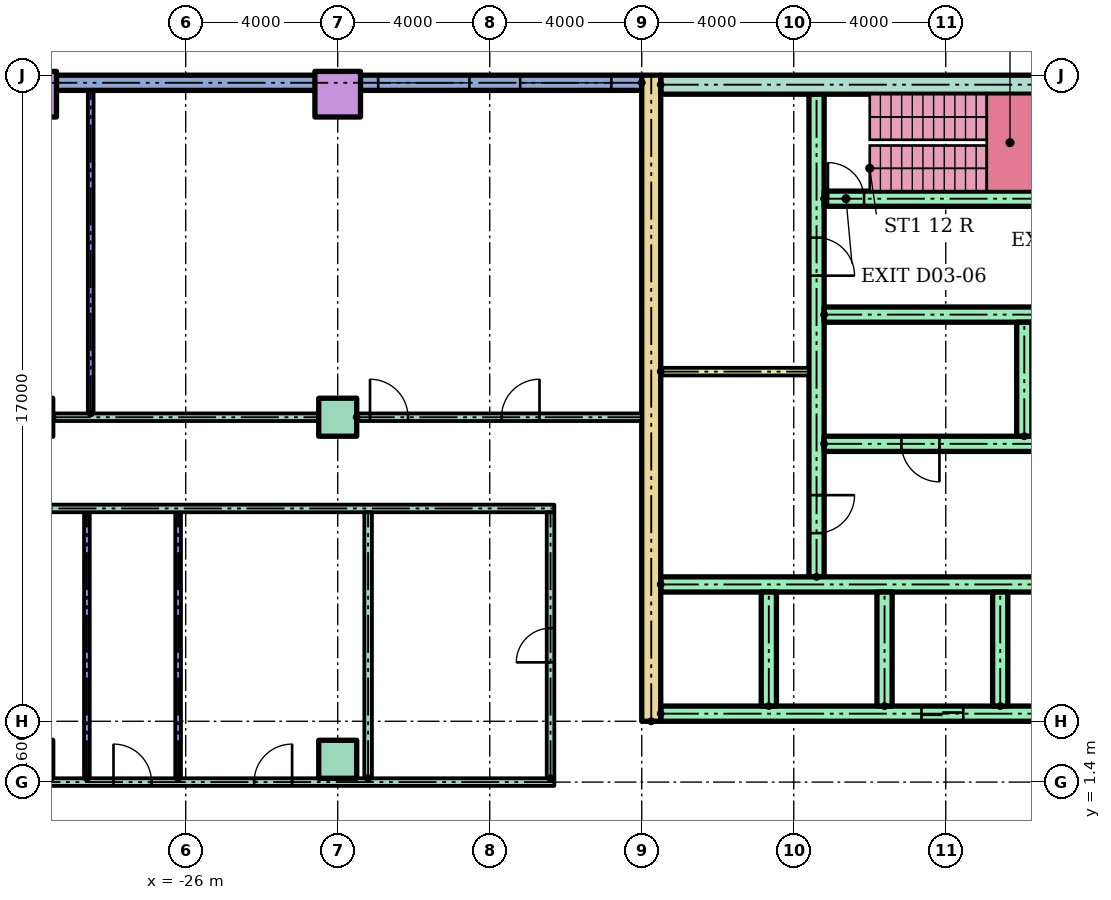
"""IFC4 building model, lengths in metres.
Left out: names, types, materials, properties, quantities, classifications, styles, units other than length and angle.
Written with IfcOpenShell. Run it as: python <this file> out.ifc"""

import sys

from ifc_helpers import new_model, si_unit, direction, frame, frame_2d, origin, origin_2d, place, context, subcontext, project, spatial, rectangle, hollow_rectangle, extrude, element, fill, save


model = new_model("IFC4")
c1 = context("Model", 3, precision=1e-05, world=origin(), true_north=direction((0.0, 1.0)))
c2 = subcontext(c1, "Body", "Model", "MODEL_VIEW")
j1 = project(units=[si_unit("LENGTHUNIT", "METRE"), si_unit("PLANEANGLEUNIT", "RADIAN")], contexts=[c1])
p1 = place(None, origin())
s1 = spatial("IfcSite", under=j1, at=p1, CompositionType="ELEMENT")
p2 = place(p1, origin())
s2 = spatial("IfcBuilding", under=s1, at=p2, CompositionType="ELEMENT")
p3 = place(p2, frame((0.0, 0.0, 14.0)))
s3 = spatial("IfcBuildingStorey", under=s2, at=p3, CompositionType="ELEMENT", Elevation=14.0)
for number, where in (
    (1, (-30.0, 2.0, 0.0)),
    (2, (-22.0, 2.0, 0.0)),
    (3, (-30.0, 11.0, 0.0)),
    (4, (-22.0, 11.0, 0.0)),
):
    element("IfcColumn", number, at=place(p3, frame(where)), inside=s3, PredefinedType="COLUMN", context=c2, shape_type="SweptSolid", body=[
        extrude(rectangle(XDim=1.0, YDim=1.0, at=origin_2d()), origin(), (0.0, 0.0, 1.0), 4.0),
    ])
for number, where in (
    (5, (-30.0, 19.5, 0.0)),
    (6, (-22.0, 19.5, 0.0)),
):
    element("IfcColumn", number, at=place(p3, frame(where)), inside=s3, PredefinedType="COLUMN", context=c2, shape_type="SweptSolid", body=[
        extrude(hollow_rectangle(XDim=1.2, YDim=1.2, WallThickness=0.06, at=origin_2d()), origin(), (0.0, 0.0, 1.0), 4.0),
    ])
p4 = place(p3, frame((-14.0, 19.8, 0.0), z_axis=(0.0, 0.0, 1.0), x_axis=(-1.0, 0.0, 0.0)))
e7 = element("IfcWall", 7, at=p4, inside=s3, PredefinedType="STANDARD", context=c2, shape_type="SweptSolid", body=[
    extrude(rectangle(XDim=25.6, YDim=0.4, at=frame_2d((12.8, 0.0))), origin(), (0.0, 0.0, 1.0), 3.7),
])
p5 = place(p4, frame((0.8, 0.0, 0.9)))
e8 = element("IfcOpeningElement", 8, at=p5, cuts=e7, PredefinedType="OPENING", context=c2, shape_type="SweptSolid", body=[
    extrude(rectangle(XDim=2.4, YDim=2.1, at=frame_2d((1.2, 1.05))), frame((0.0, 0.21, 0.0), z_axis=(0.0, -1.0, 0.0), x_axis=(1.0, 0.0, 0.0)), (0.0, 0.0, 1.0), 0.42),
])
p6 = place(p4, frame((4.535, 0.0, 0.9)))
e9 = element("IfcOpeningElement", 9, at=p6, cuts=e7, PredefinedType="OPENING", context=c2, shape_type="SweptSolid", body=[
    extrude(rectangle(XDim=2.4, YDim=2.1, at=frame_2d((1.2, 1.05))), frame((0.0, 0.21, 0.0), z_axis=(0.0, -1.0, 0.0), x_axis=(1.0, 0.0, 0.0)), (0.0, 0.0, 1.0), 0.42),
])
p7 = place(p4, frame((20.8, 0.0, 0.9)))
e10 = element("IfcOpeningElement", 10, at=p7, cuts=e7, PredefinedType="OPENING", context=c2, shape_type="SweptSolid", body=[
    extrude(rectangle(XDim=2.4, YDim=2.1, at=frame_2d((1.2, 1.05))), frame((0.0, 0.21, 0.0), z_axis=(0.0, -1.0, 0.0), x_axis=(1.0, 0.0, 0.0)), (0.0, 0.0, 1.0), 0.42),
])
p8 = place(p3, frame((-13.75, 3.0, 0.0), z_axis=(0.0, 0.0, 1.0), x_axis=(0.0, 1.0, 0.0)))
e11 = element("IfcWall", 11, at=p8, inside=s3, PredefinedType="SHEAR", context=c2, shape_type="SweptSolid", body=[
    extrude(rectangle(XDim=17.0, YDim=0.5, at=frame_2d((8.5, 0.0))), origin(), (0.0, 0.0, 1.0), 3.7),
])
p9 = place(p3, frame((-13.5, 19.75, 0.0)))
e12 = element("IfcWall", 12, at=p9, inside=s3, PredefinedType="SHEAR", context=c2, shape_type="SweptSolid", body=[
    extrude(rectangle(XDim=27.0, YDim=0.5, at=frame_2d((13.5, 0.0))), origin(), (0.0, 0.0, 1.0), 3.7),
])
p10 = place(p3, frame((-9.4, 6.8, 0.0), z_axis=(0.0, 0.0, 1.0), x_axis=(0.0, 1.0, 0.0)))
e13 = element("IfcWall", 13, at=p10, inside=s3, PredefinedType="SHEAR", context=c2, shape_type="SweptSolid", body=[
    extrude(rectangle(XDim=12.7, YDim=0.4, at=frame_2d((6.35, 0.0))), origin(), (0.0, 0.0, 1.0), 3.7),
])
p11 = place(p10, frame((1.15, 0.0, 0.0)))
e14 = element("IfcOpeningElement", 14, at=p11, cuts=e13, PredefinedType="OPENING", context=c2, shape_type="SweptSolid", body=[
    extrude(rectangle(XDim=1.0, YDim=2.1, at=frame_2d((0.5, 1.05))), frame((0.0, 0.21, 0.0), z_axis=(0.0, -1.0, 0.0), x_axis=(1.0, 0.0, 0.0)), (0.0, 0.0, 1.0), 0.42),
])
p12 = place(p10, frame((7.925, 0.0, 0.0)))
e15 = element("IfcOpeningElement", 15, at=p12, cuts=e13, PredefinedType="OPENING", context=c2, shape_type="SweptSolid", body=[
    extrude(rectangle(XDim=1.0, YDim=2.1, at=frame_2d((0.5, 1.05))), frame((0.0, 0.21, 0.0), z_axis=(0.0, -1.0, 0.0), x_axis=(1.0, 0.0, 0.0)), (0.0, 0.0, 1.0), 0.42),
])
p13 = place(p3, frame((-13.5, 3.2, 0.0)))
e16 = element("IfcWall", 16, at=p13, inside=s3, PredefinedType="SHEAR", context=c2, shape_type="SweptSolid", body=[
    extrude(rectangle(XDim=27.0, YDim=0.4, at=frame_2d((13.5, 0.0))), origin(), (0.0, 0.0, 1.0), 3.7),
])
p14 = place(p13, frame((6.861, 0.0, 0.0)))
e17 = element("IfcOpeningElement", 17, at=p14, cuts=e16, PredefinedType="OPENING", context=c2, shape_type="SweptSolid", body=[
    extrude(rectangle(XDim=1.1, YDim=2.1, at=frame_2d((0.55, 1.05))), frame((0.0, 0.21, 0.0), z_axis=(0.0, -1.0, 0.0), x_axis=(1.0, 0.0, 0.0)), (0.0, 0.0, 1.0), 0.42),
])
p15 = place(p13, frame((9.906, 0.0, 0.0)))
e18 = element("IfcOpeningElement", 18, at=p15, cuts=e16, PredefinedType="OPENING", context=c2, shape_type="SweptSolid", body=[
    extrude(rectangle(XDim=1.1, YDim=2.1, at=frame_2d((0.55, 1.05))), frame((0.0, 0.21, 0.0), z_axis=(0.0, -1.0, 0.0), x_axis=(1.0, 0.0, 0.0)), (0.0, 0.0, 1.0), 0.42),
])
p16 = place(p13, frame((15.994, 0.0, 0.0)))
e19 = element("IfcOpeningElement", 19, at=p16, cuts=e16, PredefinedType="OPENING", context=c2, shape_type="SweptSolid", body=[
    extrude(rectangle(XDim=1.1, YDim=2.1, at=frame_2d((0.55, 1.05))), frame((0.0, 0.21, 0.0), z_axis=(0.0, -1.0, 0.0), x_axis=(1.0, 0.0, 0.0)), (0.0, 0.0, 1.0), 0.42),
])
p17 = place(p13, frame((19.039, 0.0, 0.0)))
e20 = element("IfcOpeningElement", 20, at=p17, cuts=e16, PredefinedType="OPENING", context=c2, shape_type="SweptSolid", body=[
    extrude(rectangle(XDim=1.1, YDim=2.1, at=frame_2d((0.55, 1.05))), frame((0.0, 0.21, 0.0), z_axis=(0.0, -1.0, 0.0), x_axis=(1.0, 0.0, 0.0)), (0.0, 0.0, 1.0), 0.42),
])
p18 = place(p13, frame((12.6, 0.0, 0.0)))
e21 = element("IfcOpeningElement", 21, at=p18, cuts=e16, PredefinedType="OPENING", context=c2, shape_type="SweptSolid", body=[
    extrude(rectangle(XDim=1.8, YDim=2.1, at=frame_2d((0.9, 1.05))), frame((0.0, 0.21, 0.0), z_axis=(0.0, -1.0, 0.0), x_axis=(1.0, 0.0, 0.0)), (0.0, 0.0, 1.0), 0.42),
])
p19 = place(p3, frame((-13.5, 6.6, 0.0)))
e22 = element("IfcWall", 22, at=p19, inside=s3, PredefinedType="SHEAR", context=c2, shape_type="SweptSolid", body=[
    extrude(rectangle(XDim=11.978, YDim=0.4, at=frame_2d((5.989, 0.0))), origin(), (0.0, 0.0, 1.0), 3.7),
])
for number, where, z_axis, x_axis in (
    (23, (-10.656, 3.4, 0.0), (0.0, 0.0, 1.0), (0.0, 1.0, 0.0)),
    (24, (-7.611, 3.4, 0.0), (0.0, 0.0, 1.0), (0.0, 1.0, 0.0)),
    (25, (-4.567, 3.4, 0.0), (0.0, 0.0, 1.0), (0.0, 1.0, 0.0)),
):
    element("IfcWall", number, at=place(p3, frame(where, z_axis=z_axis, x_axis=x_axis)), inside=s3, PredefinedType="SHEAR", context=c2, shape_type="SweptSolid", body=[
        extrude(rectangle(XDim=3.0, YDim=0.4, at=frame_2d((1.5, 0.0))), origin(), (0.0, 0.0, 1.0), 3.7),
    ])
p20 = place(p3, frame((-9.2, 10.3, 0.0)))
e26 = element("IfcWall", 26, at=p20, inside=s3, PredefinedType="SHEAR", context=c2, shape_type="SweptSolid", body=[
    extrude(rectangle(XDim=8.0, YDim=0.4, at=frame_2d((4.0, 0.0))), origin(), (0.0, 0.0, 1.0), 3.7),
])
p21 = place(p20, frame((2.033, 0.0, 0.0)))
e27 = element("IfcOpeningElement", 27, at=p21, cuts=e26, PredefinedType="OPENING", context=c2, shape_type="SweptSolid", body=[
    extrude(rectangle(XDim=1.0, YDim=2.1, at=frame_2d((0.5, 1.05))), frame((0.0, 0.21, 0.0), z_axis=(0.0, -1.0, 0.0), x_axis=(1.0, 0.0, 0.0)), (0.0, 0.0, 1.0), 0.42),
])
p22 = place(p20, frame((6.133, 0.0, 0.0)))
e28 = element("IfcOpeningElement", 28, at=p22, cuts=e26, PredefinedType="OPENING", context=c2, shape_type="SweptSolid", body=[
    extrude(rectangle(XDim=1.0, YDim=2.1, at=frame_2d((0.5, 1.05))), frame((0.0, 0.21, 0.0), z_axis=(0.0, -1.0, 0.0), x_axis=(1.0, 0.0, 0.0)), (0.0, 0.0, 1.0), 0.42),
])
p23 = place(p3, frame((-9.2, 13.7, 0.0)))
e29 = element("IfcWall", 29, at=p23, inside=s3, PredefinedType="SHEAR", context=c2, shape_type="SweptSolid", body=[
    extrude(rectangle(XDim=8.0, YDim=0.4, at=frame_2d((4.0, 0.0))), origin(), (0.0, 0.0, 1.0), 3.7),
])
p24 = place(p3, frame((-3.933, 10.5, 0.0), z_axis=(0.0, 0.0, 1.0), x_axis=(0.0, 1.0, 0.0)))
e30 = element("IfcWall", 30, at=p24, inside=s3, PredefinedType="SHEAR", context=c2, shape_type="SweptSolid", body=[
    extrude(rectangle(XDim=3.0, YDim=0.4, at=frame_2d((1.5, 0.0))), origin(), (0.0, 0.0, 1.0), 3.7),
])
p25 = place(p3, frame((-9.2, 16.75, 0.0)))
e31 = element("IfcWall", 31, at=p25, inside=s3, PredefinedType="SHEAR", context=c2, shape_type="SweptSolid", body=[
    extrude(rectangle(XDim=18.4, YDim=0.4, at=frame_2d((9.2, 0.0))), origin(), (0.0, 0.0, 1.0), 3.7),
])
p26 = place(p25, frame((0.1, 0.0, 0.0)))
e32 = element("IfcOpeningElement", 32, at=p26, cuts=e31, PredefinedType="OPENING", context=c2, shape_type="SweptSolid", body=[
    extrude(rectangle(XDim=0.95, YDim=2.1, at=frame_2d((0.475, 1.05))), frame((0.0, 0.21, 0.0), z_axis=(0.0, -1.0, 0.0), x_axis=(1.0, 0.0, 0.0)), (0.0, 0.0, 1.0), 0.42),
])
p27 = place(p25, frame((6.1, 0.0, 0.0)))
e33 = element("IfcOpeningElement", 33, at=p27, cuts=e31, PredefinedType="OPENING", context=c2, shape_type="SweptSolid", body=[
    extrude(rectangle(XDim=0.95, YDim=2.1, at=frame_2d((0.475, 1.05))), frame((0.0, 0.21, 0.0), z_axis=(0.0, -1.0, 0.0), x_axis=(1.0, 0.0, 0.0)), (0.0, 0.0, 1.0), 0.42),
])
p28 = place(p25, frame((12.1, 0.0, 0.0)))
e34 = element("IfcOpeningElement", 34, at=p28, cuts=e31, PredefinedType="OPENING", context=c2, shape_type="SweptSolid", body=[
    extrude(rectangle(XDim=0.95, YDim=2.1, at=frame_2d((0.475, 1.05))), frame((0.0, 0.21, 0.0), z_axis=(0.0, -1.0, 0.0), x_axis=(1.0, 0.0, 0.0)), (0.0, 0.0, 1.0), 0.42),
])
p29 = place(p3, frame((-13.5, 12.2, 0.0)))
e35 = element("IfcWall", 35, at=p29, inside=s3, PredefinedType="PARTITIONING", context=c2, shape_type="SweptSolid", body=[
    extrude(rectangle(XDim=3.9, YDim=0.2, at=frame_2d((1.95, 0.0))), origin(), (0.0, 0.0, 1.0), 3.7),
])
p30 = place(p3, frame((-36.9, 1.4, 0.0)))
e36 = element("IfcWall", 36, at=p30, inside=s3, PredefinedType="PARTITIONING", context=c2, shape_type="SweptSolid", body=[
    extrude(rectangle(XDim=20.6, YDim=0.2, at=frame_2d((10.3, 0.0))), origin(), (0.0, 0.0, 1.0), 3.7),
])
p31 = place(p30, frame((5.25, 0.0, 0.0)))
e37 = element("IfcOpeningElement", 37, at=p31, cuts=e36, PredefinedType="OPENING", context=c2, shape_type="SweptSolid", body=[
    extrude(rectangle(XDim=1.0, YDim=2.1, at=frame_2d((0.5, 1.05))), frame((0.0, 0.11, 0.0), z_axis=(0.0, -1.0, 0.0), x_axis=(1.0, 0.0, 0.0)), (0.0, 0.0, 1.0), 0.22),
])
p32 = place(p30, frame((9.0, 0.0, 0.0)))
e38 = element("IfcOpeningElement", 38, at=p32, cuts=e36, PredefinedType="OPENING", context=c2, shape_type="SweptSolid", body=[
    extrude(rectangle(XDim=1.0, YDim=2.1, at=frame_2d((0.5, 1.05))), frame((0.0, 0.11, 0.0), z_axis=(0.0, -1.0, 0.0), x_axis=(1.0, 0.0, 0.0)), (0.0, 0.0, 1.0), 0.22),
])
p33 = place(p30, frame((12.7, 0.0, 0.0)))
e39 = element("IfcOpeningElement", 39, at=p33, cuts=e36, PredefinedType="OPENING", context=c2, shape_type="SweptSolid", body=[
    extrude(rectangle(XDim=1.0, YDim=2.1, at=frame_2d((0.5, 1.05))), frame((0.0, 0.11, 0.0), z_axis=(0.0, -1.0, 0.0), x_axis=(1.0, 0.0, 0.0)), (0.0, 0.0, 1.0), 0.22),
])
p34 = place(p3, frame((-37.6, 8.6, 0.0)))
e40 = element("IfcWall", 40, at=p34, inside=s3, PredefinedType="PARTITIONING", context=c2, shape_type="SweptSolid", body=[
    extrude(rectangle(XDim=21.3, YDim=0.2, at=frame_2d((10.65, 0.0))), origin(), (0.0, 0.0, 1.0), 3.7),
])
p35 = place(p3, frame((-29.5, 11.0, 0.0)))
e41 = element("IfcWall", 41, at=p35, inside=s3, PredefinedType="PARTITIONING", context=c2, shape_type="SweptSolid", body=[
    extrude(rectangle(XDim=7.0, YDim=0.2, at=frame_2d((3.5, 0.0))), origin(), (0.0, 0.0, 1.0), 3.7),
])
p36 = place(p3, frame((-21.5, 11.0, 0.0)))
e42 = element("IfcWall", 42, at=p36, inside=s3, PredefinedType="PARTITIONING", context=c2, shape_type="SweptSolid", body=[
    extrude(rectangle(XDim=7.5, YDim=0.2, at=frame_2d((3.75, 0.0))), origin(), (0.0, 0.0, 1.0), 3.7),
])
p37 = place(p36, frame((0.35, 0.0, 0.0)))
e43 = element("IfcOpeningElement", 43, at=p37, cuts=e42, PredefinedType="OPENING", context=c2, shape_type="SweptSolid", body=[
    extrude(rectangle(XDim=1.0, YDim=2.1, at=frame_2d((0.5, 1.05))), frame((0.0, 0.11, 0.0), z_axis=(0.0, -1.0, 0.0), x_axis=(1.0, 0.0, 0.0)), (0.0, 0.0, 1.0), 0.22),
])
p38 = place(p36, frame((3.81, 0.0, 0.0)))
e44 = element("IfcOpeningElement", 44, at=p38, cuts=e42, PredefinedType="OPENING", context=c2, shape_type="SweptSolid", body=[
    extrude(rectangle(XDim=1.0, YDim=2.1, at=frame_2d((0.5, 1.05))), frame((0.0, 0.11, 0.0), z_axis=(0.0, -1.0, 0.0), x_axis=(1.0, 0.0, 0.0)), (0.0, 0.0, 1.0), 0.22),
])
p39 = place(p3, frame((-28.6, 1.5, 0.0), z_axis=(0.0, 0.0, 1.0), x_axis=(0.0, 1.0, 0.0)))
e45 = element("IfcWall", 45, at=p39, inside=s3, PredefinedType="PARTITIONING", context=c2, shape_type="SweptSolid", body=[
    extrude(rectangle(XDim=7.0, YDim=0.15, at=frame_2d((3.5, 0.0))), origin(), (0.0, 0.0, 1.0), 3.7),
])
p40 = place(p3, frame((-28.5, 11.1, 0.0), z_axis=(0.0, 0.0, 1.0), x_axis=(0.0, 1.0, 0.0)))
e46 = element("IfcWall", 46, at=p40, inside=s3, PredefinedType="PARTITIONING", context=c2, shape_type="SweptSolid", body=[
    extrude(rectangle(XDim=8.5, YDim=0.15, at=frame_2d((4.25, 0.0))), origin(), (0.0, 0.0, 1.0), 3.7),
])
p41 = place(p3, frame((-26.2, 1.5, 0.0), z_axis=(0.0, 0.0, 1.0), x_axis=(0.0, 1.0, 0.0)))
e47 = element("IfcWall", 47, at=p41, inside=s3, PredefinedType="PARTITIONING", context=c2, shape_type="SweptSolid", body=[
    extrude(rectangle(XDim=7.0, YDim=0.15, at=frame_2d((3.5, 0.0))), origin(), (0.0, 0.0, 1.0), 3.7),
])
p42 = place(p3, frame((-21.2, 1.5, 0.0), z_axis=(0.0, 0.0, 1.0), x_axis=(0.0, 1.0, 0.0)))
e48 = element("IfcWall", 48, at=p42, inside=s3, PredefinedType="PARTITIONING", context=c2, shape_type="SweptSolid", body=[
    extrude(rectangle(XDim=7.0, YDim=0.2, at=frame_2d((3.5, 0.0))), origin(), (0.0, 0.0, 1.0), 3.7),
])
p43 = place(p3, frame((-16.4, 1.5, 0.0), z_axis=(0.0, 0.0, 1.0), x_axis=(0.0, 1.0, 0.0)))
e49 = element("IfcWall", 49, at=p43, inside=s3, PredefinedType="PARTITIONING", context=c2, shape_type="SweptSolid", body=[
    extrude(rectangle(XDim=7.0, YDim=0.2, at=frame_2d((3.5, 0.0))), origin(), (0.0, 0.0, 1.0), 3.7),
])
p44 = place(p43, frame((3.05, 0.0, 0.0)))
e50 = element("IfcOpeningElement", 50, at=p44, cuts=e49, PredefinedType="OPENING", context=c2, shape_type="SweptSolid", body=[
    extrude(rectangle(XDim=0.9, YDim=2.1, at=frame_2d((0.45, 1.05))), frame((0.0, 0.11, 0.0), z_axis=(0.0, -1.0, 0.0), x_axis=(1.0, 0.0, 0.0)), (0.0, 0.0, 1.0), 0.22),
])
p45 = place(p5, origin())
e51 = element("IfcWindow", 51, at=p45, inside=s3, PartitioningType="SINGLE_PANEL", PredefinedType="WINDOW", context=c2, shape_type="SweptSolid", body=[
    extrude(rectangle(XDim=2.4, YDim=2.1, at=frame_2d((1.2, 1.05))), frame((0.0, 0.03, 0.0), z_axis=(0.0, -1.0, 0.0), x_axis=(1.0, 0.0, 0.0)), (0.0, 0.0, 1.0), 0.06),
])
fill(e8, e51)
p46 = place(p6, origin())
e52 = element("IfcWindow", 52, at=p46, inside=s3, PartitioningType="SINGLE_PANEL", PredefinedType="WINDOW", context=c2, shape_type="SweptSolid", body=[
    extrude(rectangle(XDim=2.4, YDim=2.1, at=frame_2d((1.2, 1.05))), frame((0.0, 0.03, 0.0), z_axis=(0.0, -1.0, 0.0), x_axis=(1.0, 0.0, 0.0)), (0.0, 0.0, 1.0), 0.06),
])
fill(e9, e52)
p47 = place(p14, origin())
e53 = element("IfcDoor", 53, at=p47, inside=s3, OperationType="SLIDING_TO_LEFT", PredefinedType="DOOR", context=c2, shape_type="SweptSolid", body=[
    extrude(rectangle(XDim=1.1, YDim=2.1, at=frame_2d((0.55, 1.05))), frame((0.0, 0.025, 0.0), z_axis=(0.0, -1.0, 0.0), x_axis=(1.0, 0.0, 0.0)), (0.0, 0.0, 1.0), 0.05),
])
fill(e17, e53)
p48 = place(p21, frame((1.0, 0.0, 0.0), z_axis=(0.0, 0.0, 1.0), x_axis=(-1.0, 0.0, 0.0)))
e54 = element("IfcDoor", 54, at=p48, inside=s3, OperationType="SINGLE_SWING_RIGHT", PredefinedType="DOOR", context=c2, shape_type="SweptSolid", body=[
    extrude(rectangle(XDim=1.0, YDim=2.1, at=frame_2d((0.5, 1.05))), frame((0.0, 0.025, 0.0), z_axis=(0.0, -1.0, 0.0), x_axis=(1.0, 0.0, 0.0)), (0.0, 0.0, 1.0), 0.05),
])
fill(e27, e54)
p49 = place(p26, origin())
e55 = element("IfcDoor", 55, at=p49, inside=s3, OperationType="SINGLE_SWING_LEFT", PredefinedType="DOOR", context=c2, shape_type="SweptSolid", body=[
    extrude(rectangle(XDim=0.95, YDim=2.1, at=frame_2d((0.475, 1.05))), frame((0.0, 0.025, 0.0), z_axis=(0.0, -1.0, 0.0), x_axis=(1.0, 0.0, 0.0)), (0.0, 0.0, 1.0), 0.05),
])
fill(e32, e55)
p50 = place(p11, frame((1.0, 0.0, 0.0), z_axis=(0.0, 0.0, 1.0), x_axis=(-1.0, 0.0, 0.0)))
e56 = element("IfcDoor", 56, at=p50, inside=s3, OperationType="SINGLE_SWING_RIGHT", PredefinedType="DOOR", context=c2, shape_type="SweptSolid", body=[
    extrude(rectangle(XDim=1.0, YDim=2.1, at=frame_2d((0.5, 1.05))), frame((0.0, 0.025, 0.0), z_axis=(0.0, -1.0, 0.0), x_axis=(1.0, 0.0, 0.0)), (0.0, 0.0, 1.0), 0.05),
])
fill(e14, e56)
p51 = place(p12, frame((1.0, 0.0, 0.0), z_axis=(0.0, 0.0, 1.0), x_axis=(-1.0, 0.0, 0.0)))
e57 = element("IfcDoor", 57, at=p51, inside=s3, OperationType="SINGLE_SWING_LEFT", PredefinedType="DOOR", context=c2, shape_type="SweptSolid", body=[
    extrude(rectangle(XDim=1.0, YDim=2.1, at=frame_2d((0.5, 1.05))), frame((0.0, 0.025, 0.0), z_axis=(0.0, -1.0, 0.0), x_axis=(1.0, 0.0, 0.0)), (0.0, 0.0, 1.0), 0.05),
])
fill(e15, e57)
p52 = place(p32, origin())
e58 = element("IfcDoor", 58, at=p52, inside=s3, OperationType="SINGLE_SWING_LEFT", PredefinedType="DOOR", context=c2, shape_type="SweptSolid", body=[
    extrude(rectangle(XDim=1.0, YDim=2.1, at=frame_2d((0.5, 1.05))), frame((0.0, 0.025, 0.0), z_axis=(0.0, -1.0, 0.0), x_axis=(1.0, 0.0, 0.0)), (0.0, 0.0, 1.0), 0.05),
])
fill(e38, e58)
p53 = place(p33, origin())
e59 = element("IfcDoor", 59, at=p53, inside=s3, OperationType="SINGLE_SWING_RIGHT", PredefinedType="DOOR", context=c2, shape_type="SweptSolid", body=[
    extrude(rectangle(XDim=1.0, YDim=2.1, at=frame_2d((0.5, 1.05))), frame((0.0, 0.025, 0.0), z_axis=(0.0, -1.0, 0.0), x_axis=(1.0, 0.0, 0.0)), (0.0, 0.0, 1.0), 0.05),
])
fill(e39, e59)
p54 = place(p44, origin())
e60 = element("IfcDoor", 60, at=p54, inside=s3, OperationType="SINGLE_SWING_LEFT", PredefinedType="DOOR", context=c2, shape_type="SweptSolid", body=[
    extrude(rectangle(XDim=0.9, YDim=2.1, at=frame_2d((0.45, 1.05))), frame((0.0, 0.025, 0.0), z_axis=(0.0, -1.0, 0.0), x_axis=(1.0, 0.0, 0.0)), (0.0, 0.0, 1.0), 0.05),
])
fill(e50, e60)
p55 = place(p37, origin())
e61 = element("IfcDoor", 61, at=p55, inside=s3, OperationType="SINGLE_SWING_LEFT", PredefinedType="DOOR", context=c2, shape_type="SweptSolid", body=[
    extrude(rectangle(XDim=1.0, YDim=2.1, at=frame_2d((0.5, 1.05))), frame((0.0, 0.025, 0.0), z_axis=(0.0, -1.0, 0.0), x_axis=(1.0, 0.0, 0.0)), (0.0, 0.0, 1.0), 0.05),
])
fill(e43, e61)
p56 = place(p38, origin())
e62 = element("IfcDoor", 62, at=p56, inside=s3, OperationType="SINGLE_SWING_RIGHT", PredefinedType="DOOR", context=c2, shape_type="SweptSolid", body=[
    extrude(rectangle(XDim=1.0, YDim=2.1, at=frame_2d((0.5, 1.05))), frame((0.0, 0.025, 0.0), z_axis=(0.0, -1.0, 0.0), x_axis=(1.0, 0.0, 0.0)), (0.0, 0.0, 1.0), 0.05),
])
fill(e44, e62)
save(model, sys.argv[1])
